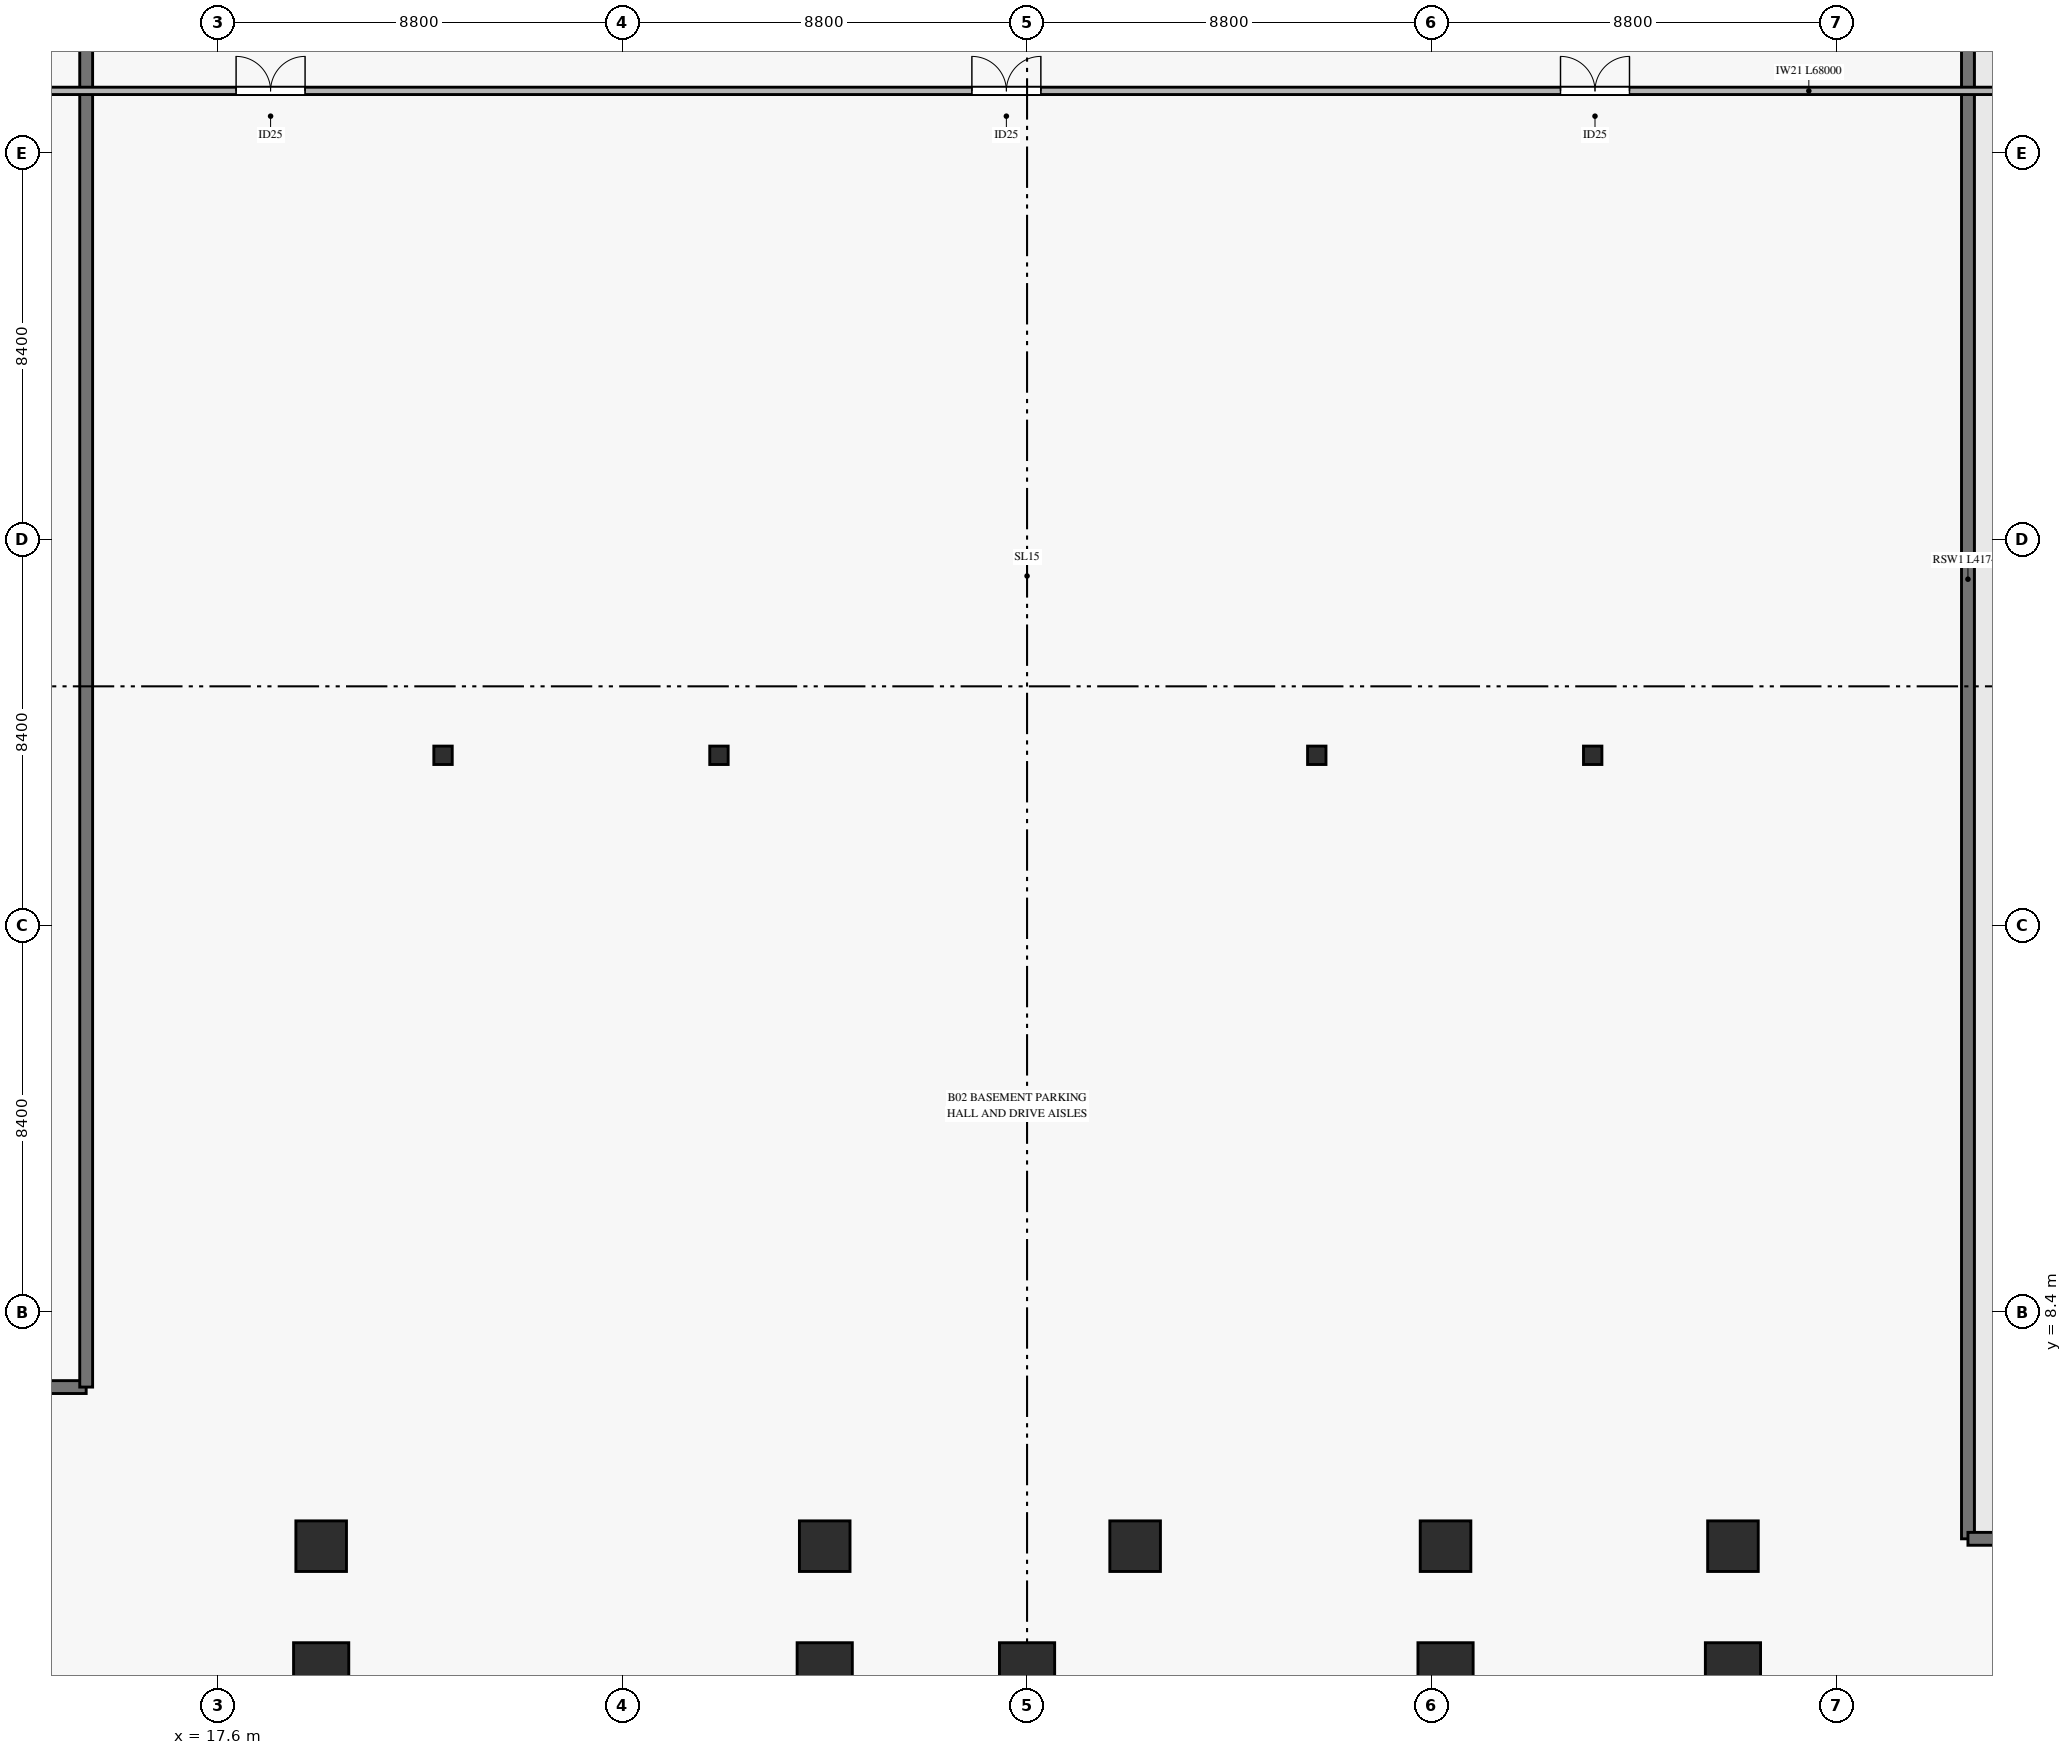
"""IFC4 building model, lengths in metres.
Left out: names, types, materials, properties, quantities, classifications, styles, units other than length and angle.
Written with IfcOpenShell. Run it as: python <this file> out.ifc"""

import sys

from ifc_helpers import new_model, si_unit, direction, frame, frame_2d, origin, origin_2d, place, context, subcontext, project, spatial, rectangle, hollow_rectangle, i_section, extrude, source, transform, mapped, element, fill, save


model = new_model("IFC4")
c1 = context("Model", 3, precision=1e-05, world=origin(), true_north=direction((0.0, 1.0)))
c2 = subcontext(c1, "Body", "Model", "MODEL_VIEW")
j1 = project(units=[si_unit("LENGTHUNIT", "METRE"), si_unit("PLANEANGLEUNIT", "RADIAN")], contexts=[c1])
p1 = place(None, origin())
s1 = spatial("IfcSite", under=j1, at=p1, CompositionType="ELEMENT")
p2 = place(p1, origin())
s2 = spatial("IfcBuilding", under=s1, at=p2, CompositionType="ELEMENT")
p3 = place(p2, frame((0.0, 0.0, -10.4)))
s3 = spatial("IfcBuildingStorey", under=s2, at=p3, CompositionType="ELEMENT", Elevation=-10.4)
m1 = source(origin(), c2, "Body", "SweptSolid", [
    extrude(hollow_rectangle(XDim=1.1, YDim=1.1, WallThickness=0.05, at=origin_2d()), origin(), (0.0, 0.0, 1.0), 4.9),
])
for number, where, z_axis, x_axis in (
    (1, (19.85, 3.3, 0.0), (0.0, 0.0, 1.0), (1.0, 0.0, 0.0)),
    (2, (30.8, 3.3, 0.0), (0.0, 0.0, 1.0), (1.0, 0.0, 0.0)),
    (3, (37.55, 3.3, 0.0), (0.0, 0.0, 1.0), (1.0, 0.0, 0.0)),
    (4, (44.3, 3.3, 0.0), (0.0, 0.0, 1.0), (1.0, 0.0, 0.0)),
    (5, (50.55, 3.3, 0.0), (0.0, 0.0, 1.0), (1.0, 0.0, 0.0)),
):
    element("IfcColumn", number, at=place(p3, frame(where, z_axis=z_axis, x_axis=x_axis)), inside=s3, PredefinedType="COLUMN", context=c2, shape_type="MappedRepresentation", body=[
        mapped(m1, transform((0.0, 0.0, 0.0), x_axis=(1.0, 0.0, 0.0), y_axis=(0.0, 1.0, 0.0), z_axis=(0.0, 0.0, 1.0), scale=1.0)),
    ])
m2 = source(origin(), c2, "Body", "SweptSolid", [
    extrude(hollow_rectangle(XDim=1.2, YDim=1.2, WallThickness=0.055, at=origin_2d()), origin(), (0.0, 0.0, 1.0), 4.9),
])
for number, where, z_axis, x_axis in (
    (6, (19.85, 0.6, 0.0), (0.0, 0.0, 1.0), (1.0, 0.0, 0.0)),
    (7, (30.8, 0.6, 0.0), (0.0, 0.0, 1.0), (1.0, 0.0, 0.0)),
    (8, (35.2, 0.6, 0.0), (0.0, 0.0, 1.0), (1.0, 0.0, 0.0)),
    (9, (44.3, 0.6, 0.0), (0.0, 0.0, 1.0), (1.0, 0.0, 0.0)),
    (10, (50.55, 0.6, 0.0), (0.0, 0.0, 1.0), (1.0, 0.0, 0.0)),
):
    element("IfcColumn", number, at=place(p3, frame(where, z_axis=z_axis, x_axis=x_axis)), inside=s3, PredefinedType="COLUMN", context=c2, shape_type="MappedRepresentation", body=[
        mapped(m2, transform((0.0, 0.0, 0.0), x_axis=(1.0, 0.0, 0.0), y_axis=(0.0, 1.0, 0.0), z_axis=(0.0, 0.0, 1.0), scale=1.0)),
    ])
m3 = source(origin(), c2, "Body", "SweptSolid", [
    extrude(i_section(OverallWidth=0.4, OverallDepth=0.4, WebThickness=0.013, FlangeThickness=0.021, at=origin_2d()), origin(), (0.0, 0.0, 1.0), 4.9),
])
for number, where, z_axis, x_axis in (
    (11, (22.5, 20.5, 0.0), (0.0, 0.0, 1.0), (1.0, 0.0, 0.0)),
    (12, (28.5, 20.5, 0.0), (0.0, 0.0, 1.0), (1.0, 0.0, 0.0)),
    (13, (41.5, 20.5, 0.0), (0.0, 0.0, 1.0), (1.0, 0.0, 0.0)),
    (14, (47.5, 20.5, 0.0), (0.0, 0.0, 1.0), (1.0, 0.0, 0.0)),
):
    element("IfcColumn", number, at=place(p3, frame(where, z_axis=z_axis, x_axis=x_axis)), inside=s3, PredefinedType="COLUMN", context=c2, shape_type="MappedRepresentation", body=[
        mapped(m3, transform((0.0, 0.0, 0.0), x_axis=(1.0, 0.0, 0.0), y_axis=(0.0, 1.0, 0.0), z_axis=(0.0, 0.0, 1.0), scale=1.0)),
    ])
p4 = place(p3, frame((55.66, 3.46, 0.0), z_axis=(0.0, 0.0, 1.0), x_axis=(0.0, 1.0, 0.0)))
e15 = element("IfcWall", 15, at=p4, inside=s3, PredefinedType="SOLIDWALL", context=c2, shape_type="SweptSolid", body=[
    extrude(rectangle(XDim=41.74, YDim=0.28, at=frame_2d((20.87, 0.0))), origin(), (0.0, 0.0, 1.0), 5.2),
])
p5 = place(p3, frame((55.66, 3.46, 0.0), z_axis=(0.0, 0.0, 1.0), x_axis=(1.0, 0.0, 0.0)))
e16 = element("IfcWall", 16, at=p5, inside=s3, PredefinedType="SOLIDWALL", context=c2, shape_type="SweptSolid", body=[
    extrude(rectangle(XDim=6.68, YDim=0.28, at=frame_2d((3.34, 0.0))), origin(), (0.0, 0.0, 1.0), 5.2),
])
p6 = place(p3, frame((8.06, 6.76, 0.0), z_axis=(0.0, 0.0, 1.0), x_axis=(1.0, 0.0, 0.0)))
e17 = element("IfcWall", 17, at=p6, inside=s3, PredefinedType="SOLIDWALL", context=c2, shape_type="SweptSolid", body=[
    extrude(rectangle(XDim=6.68, YDim=0.28, at=frame_2d((3.34, 0.0))), origin(), (0.0, 0.0, 1.0), 5.2),
])
p7 = place(p3, frame((14.74, 6.76, 0.0), z_axis=(0.0, 0.0, 1.0), x_axis=(0.0, 1.0, 0.0)))
e18 = element("IfcWall", 18, at=p7, inside=s3, PredefinedType="SOLIDWALL", context=c2, shape_type="SweptSolid", body=[
    extrude(rectangle(XDim=42.0, YDim=0.28, at=frame_2d((21.0, 0.0))), origin(), (0.0, 0.0, 1.0), 5.2),
])
p8 = place(p3, frame((1.2, 34.95, 0.0), z_axis=(0.0, 0.0, 1.0), x_axis=(1.0, 0.0, 0.0)))
e19 = element("IfcWall", 19, at=p8, inside=s3, PredefinedType="PARTITIONING", context=c2, shape_type="SweptSolid", body=[
    extrude(rectangle(XDim=68.0, YDim=0.16, at=frame_2d((34.0, 0.0))), origin(), (0.0, 0.0, 1.0), 3.785),
])
p9 = place(p8, frame((16.8, 0.0, 0.0)))
e20 = element("IfcOpeningElement", 20, at=p9, cuts=e19, PredefinedType="OPENING", context=c2, shape_type="SweptSolid", body=[
    extrude(rectangle(XDim=1.5, YDim=2.2, at=frame_2d((0.75, 1.1))), frame((0.0, 0.09, 0.0), z_axis=(0.0, -1.0, 0.0), x_axis=(1.0, 0.0, 0.0)), (0.0, 0.0, 1.0), 0.18),
])
p10 = place(p8, frame((32.8, 0.0, 0.0)))
e21 = element("IfcOpeningElement", 21, at=p10, cuts=e19, PredefinedType="OPENING", context=c2, shape_type="SweptSolid", body=[
    extrude(rectangle(XDim=1.5, YDim=2.2, at=frame_2d((0.75, 1.1))), frame((0.0, 0.09, 0.0), z_axis=(0.0, -1.0, 0.0), x_axis=(1.0, 0.0, 0.0)), (0.0, 0.0, 1.0), 0.18),
])
p11 = place(p8, frame((45.6, 0.0, 0.0)))
e22 = element("IfcOpeningElement", 22, at=p11, cuts=e19, PredefinedType="OPENING", context=c2, shape_type="SweptSolid", body=[
    extrude(rectangle(XDim=1.5, YDim=2.2, at=frame_2d((0.75, 1.1))), frame((0.0, 0.09, 0.0), z_axis=(0.0, -1.0, 0.0), x_axis=(1.0, 0.0, 0.0)), (0.0, 0.0, 1.0), 0.18),
])
p12 = place(p8, frame((2.5, 0.0, 0.0)))
e23 = element("IfcOpeningElement", 23, at=p12, cuts=e19, PredefinedType="OPENING", context=c2, shape_type="SweptSolid", body=[
    extrude(rectangle(XDim=1.5, YDim=2.2, at=frame_2d((0.75, 1.1))), frame((0.0, 0.09, 0.0), z_axis=(0.0, -1.0, 0.0), x_axis=(1.0, 0.0, 0.0)), (0.0, 0.0, 1.0), 0.18),
])
p13 = place(p8, frame((63.7, 0.0, 0.0)))
e24 = element("IfcOpeningElement", 24, at=p13, cuts=e19, PredefinedType="OPENING", context=c2, shape_type="SweptSolid", body=[
    extrude(rectangle(XDim=1.5, YDim=2.2, at=frame_2d((0.75, 1.1))), frame((0.0, 0.09, 0.0), z_axis=(0.0, -1.0, 0.0), x_axis=(1.0, 0.0, 0.0)), (0.0, 0.0, 1.0), 0.18),
])
m4 = source(origin(), c2, "Body", "SweptSolid", [
    extrude(rectangle(XDim=1.5, YDim=2.2, at=frame_2d((0.75, 1.1))), frame((0.0, 0.025, 0.0), z_axis=(0.0, -1.0, 0.0), x_axis=(1.0, 0.0, 0.0)), (0.0, 0.0, 1.0), 0.05),
])
p14 = place(p9, origin())
e25 = element("IfcDoor", 25, at=p14, inside=s3, OperationType="DOUBLE_SWING_LEFT", PredefinedType="DOOR", context=c2, shape_type="MappedRepresentation", body=[
    mapped(m4, transform((0.0, 0.0, 0.0), x_axis=(1.0, 0.0, 0.0), y_axis=(0.0, 1.0, 0.0), z_axis=(0.0, 0.0, 1.0), scale=1.0)),
])
fill(e20, e25)
p15 = place(p10, origin())
e26 = element("IfcDoor", 26, at=p15, inside=s3, OperationType="DOUBLE_SWING_LEFT", PredefinedType="DOOR", context=c2, shape_type="MappedRepresentation", body=[
    mapped(m4, transform((0.0, 0.0, 0.0), x_axis=(1.0, 0.0, 0.0), y_axis=(0.0, 1.0, 0.0), z_axis=(0.0, 0.0, 1.0), scale=1.0)),
])
fill(e21, e26)
p16 = place(p11, origin())
e27 = element("IfcDoor", 27, at=p16, inside=s3, OperationType="DOUBLE_SWING_LEFT", PredefinedType="DOOR", context=c2, shape_type="MappedRepresentation", body=[
    mapped(m4, transform((0.0, 0.0, 0.0), x_axis=(1.0, 0.0, 0.0), y_axis=(0.0, 1.0, 0.0), z_axis=(0.0, 0.0, 1.0), scale=1.0)),
])
fill(e22, e27)
save(model, sys.argv[1])
